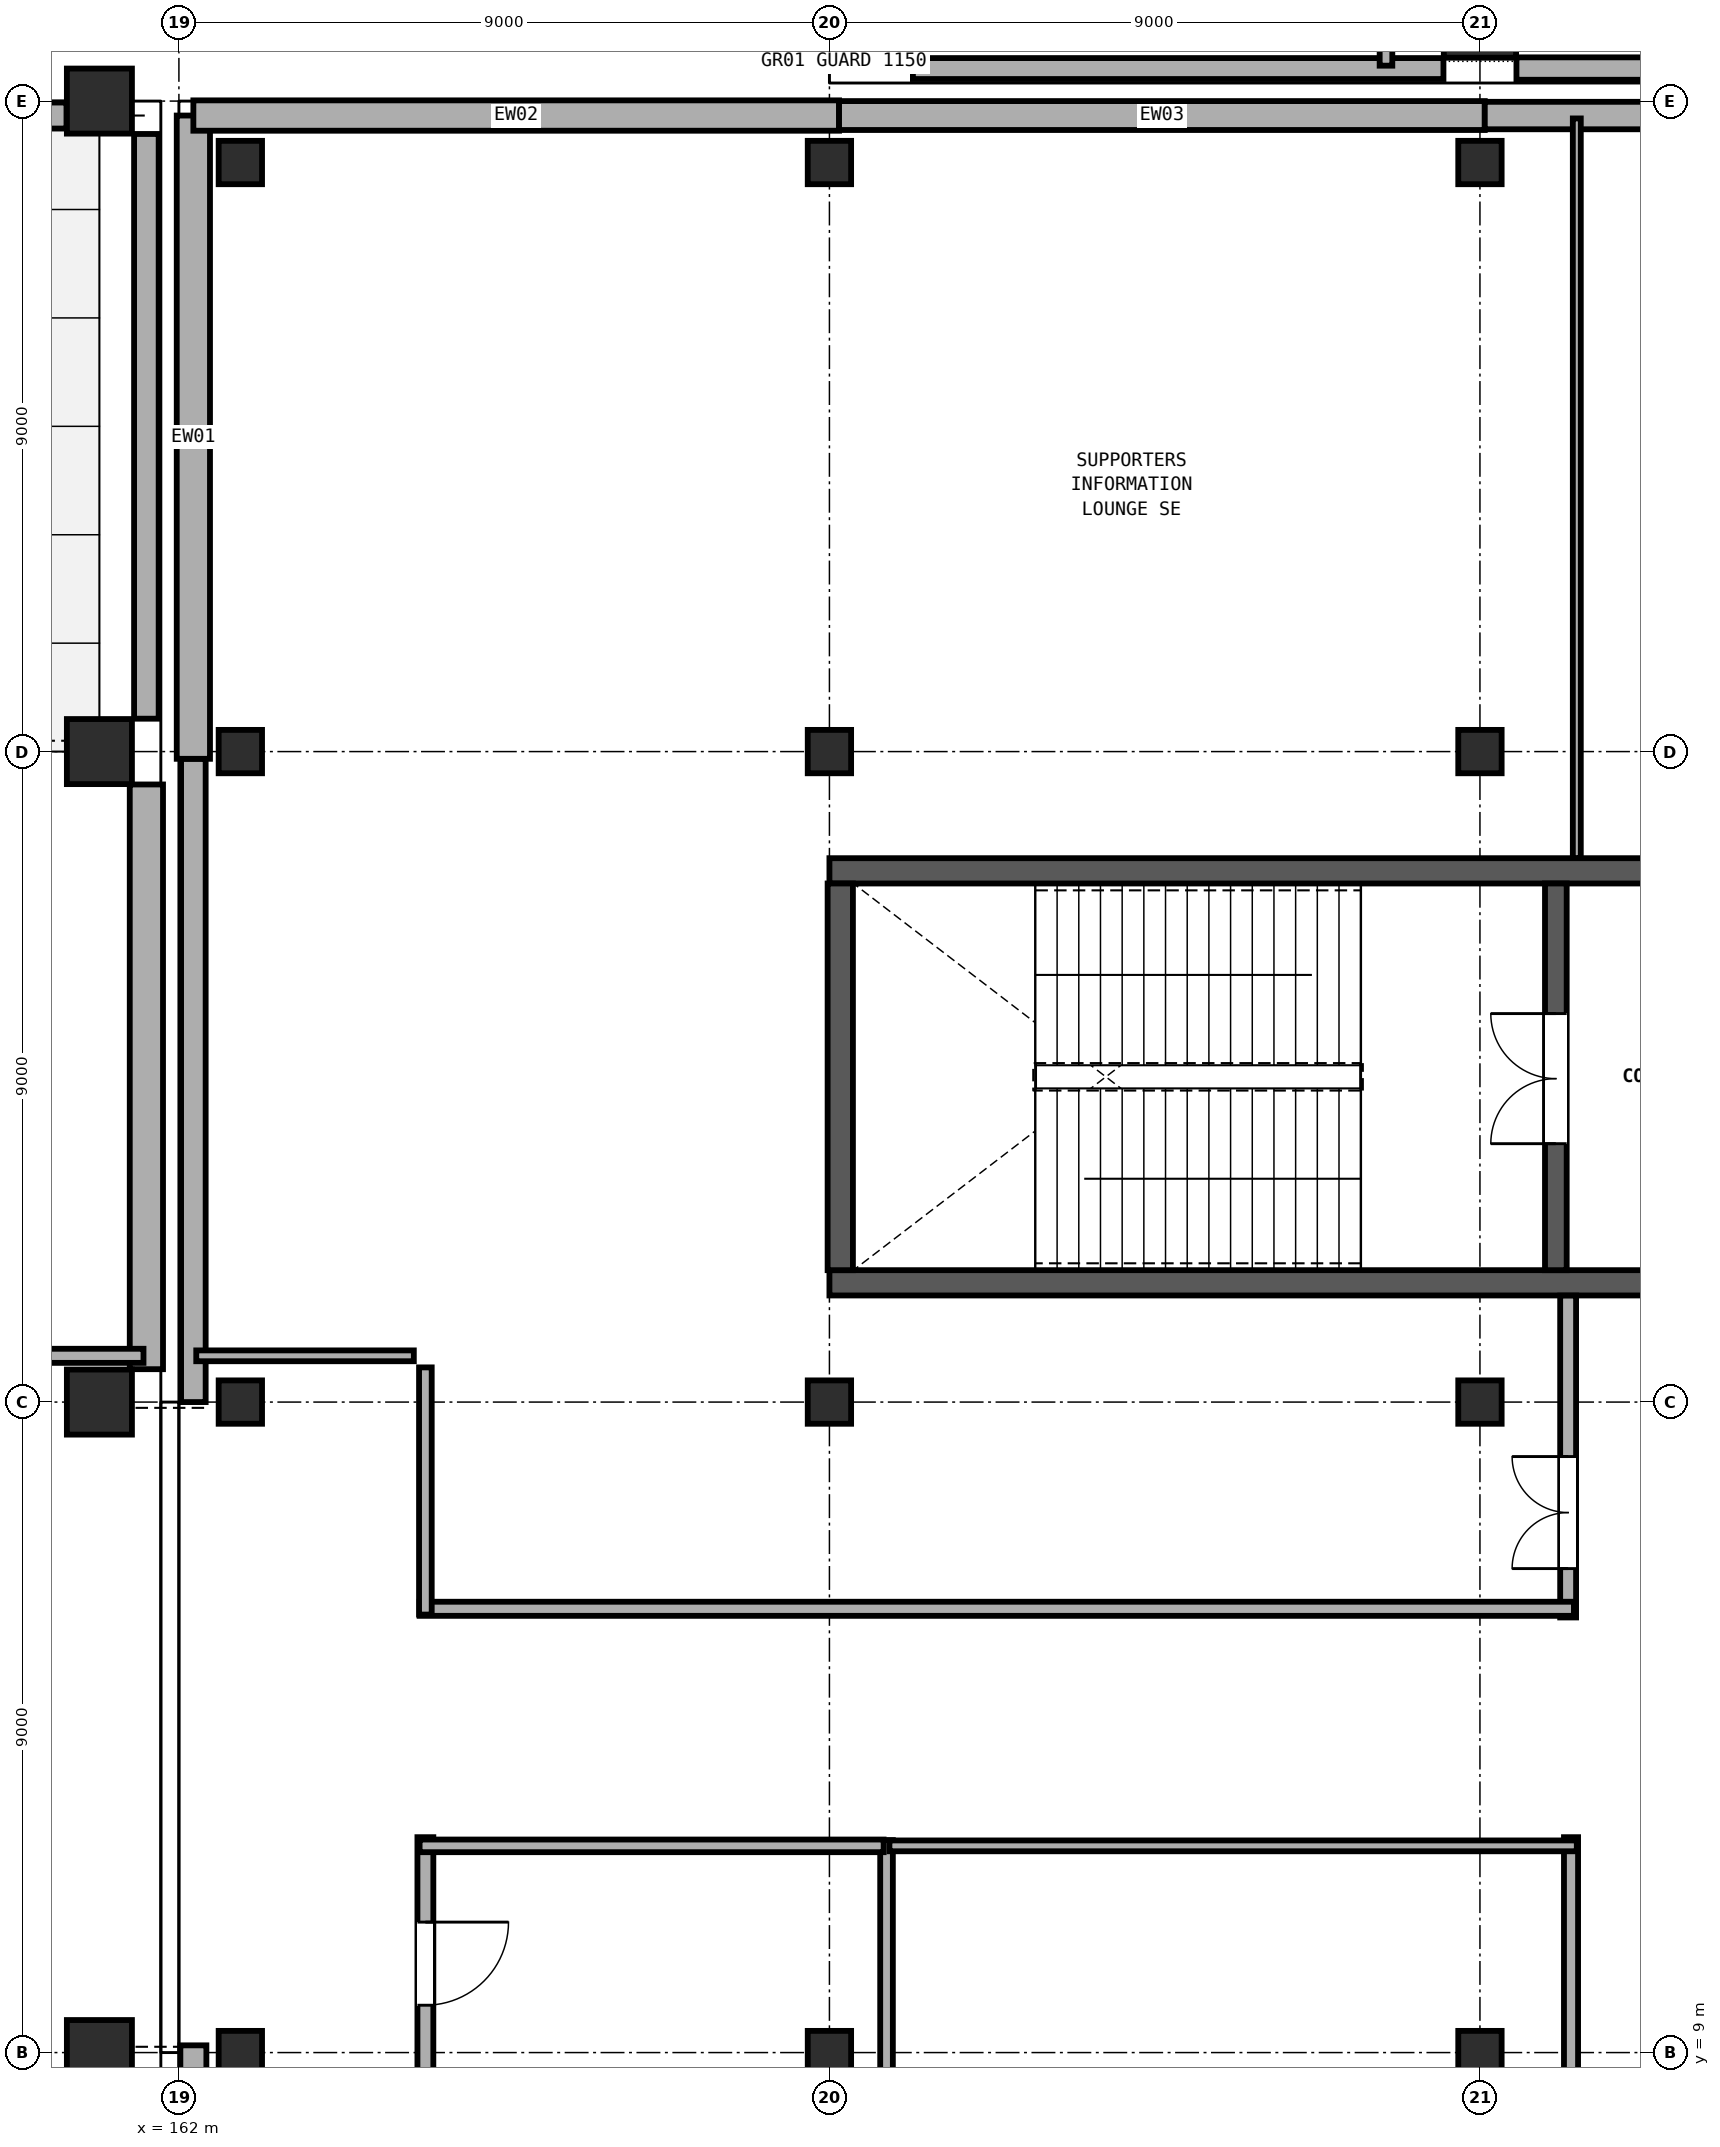
"""IFC4 building model, lengths in metres.
Left out: names, types, materials, properties, quantities, classifications, styles, units other than length and angle.
Written with IfcOpenShell. Run it as: python <this file> out.ifc"""

import sys

from ifc_helpers import new_model, si_unit, direction, frame, frame_2d, origin, origin_2d, place, context, subcontext, project, spatial, rectangle, extrude, element, fill, save


model = new_model("IFC4")
c1 = context("Model", 3, precision=1e-05, world=origin(), true_north=direction((0.0, 1.0)))
c2 = subcontext(c1, "Body", "Model", "MODEL_VIEW")
j1 = project(units=[si_unit("LENGTHUNIT", "METRE"), si_unit("PLANEANGLEUNIT", "RADIAN")], contexts=[c1])
p1 = place(None, origin())
s1 = spatial("IfcSite", under=j1, at=p1, CompositionType="ELEMENT")
p2 = place(p1, origin())
s2 = spatial("IfcBuilding", under=s1, at=p2, CompositionType="ELEMENT")
p3 = place(p2, frame((0.0, 0.0, 4.8)))
s3 = spatial("IfcBuildingStorey", under=s2, at=p3, CompositionType="ELEMENT", Elevation=4.8)
p4 = place(p3, frame((171.7, 37.1, 0.0), z_axis=(0.0, 0.0, 1.0), x_axis=(1.0, 0.0, 0.0)))
e1 = element("IfcColumn", 1, at=p4, inside=s3, PredefinedType="COLUMN", context=c2, shape_type="SweptSolid", body=[
    extrude(rectangle(XDim=0.9, YDim=0.9, at=origin_2d()), origin(), (0.0, 0.0, 1.0), 4.8),
])
p5 = place(p3, frame((180.0, 37.1, 0.0), z_axis=(0.0, 0.0, 1.0), x_axis=(1.0, 0.0, 0.0)))
e2 = element("IfcColumn", 2, at=p5, inside=s3, PredefinedType="COLUMN", context=c2, shape_type="SweptSolid", body=[
    extrude(rectangle(XDim=1.0, YDim=1.0, at=origin_2d()), origin(), (0.0, 0.0, 1.0), 4.8),
])
for number, where, z_axis, x_axis in (
    (3, (160.9, 9.0, 0.0), (0.0, 0.0, 1.0), (1.0, 0.0, 0.0)),
    (4, (160.9, 18.0, 0.0), (0.0, 0.0, 1.0), (1.0, 0.0, 0.0)),
    (5, (160.9, 27.0, 0.0), (0.0, 0.0, 1.0), (1.0, 0.0, 0.0)),
    (6, (160.9, 36.0, 0.0), (0.0, 0.0, 1.0), (1.0, 0.0, 0.0)),
):
    element("IfcColumn", number, at=place(p3, frame(where, z_axis=z_axis, x_axis=x_axis)), inside=s3, PredefinedType="COLUMN", context=c2, shape_type="SweptSolid", body=[
        extrude(rectangle(XDim=0.9, YDim=0.9, at=origin_2d()), origin(), (0.0, 0.0, 1.0), 4.8),
    ])
for number, where, z_axis, x_axis in (
    (7, (162.85, 9.0, 0.0), (0.0, 0.0, 1.0), (1.0, 0.0, 0.0)),
    (8, (162.85, 18.0, 0.0), (0.0, 0.0, 1.0), (1.0, 0.0, 0.0)),
    (9, (162.85, 27.0, 0.0), (0.0, 0.0, 1.0), (1.0, 0.0, 0.0)),
    (10, (162.85, 35.15, 0.0), (0.0, 0.0, 1.0), (1.0, 0.0, 0.0)),
    (11, (171.0, 9.0, 0.0), (0.0, 0.0, 1.0), (1.0, 0.0, 0.0)),
    (12, (171.0, 18.0, 0.0), (0.0, 0.0, 1.0), (1.0, 0.0, 0.0)),
    (13, (171.0, 27.0, 0.0), (0.0, 0.0, 1.0), (1.0, 0.0, 0.0)),
    (14, (171.0, 35.15, 0.0), (0.0, 0.0, 1.0), (1.0, 0.0, 0.0)),
    (15, (180.0, 9.0, 0.0), (0.0, 0.0, 1.0), (1.0, 0.0, 0.0)),
    (16, (180.0, 18.0, 0.0), (0.0, 0.0, 1.0), (1.0, 0.0, 0.0)),
    (17, (180.0, 27.0, 0.0), (0.0, 0.0, 1.0), (1.0, 0.0, 0.0)),
    (18, (180.0, 35.15, 0.0), (0.0, 0.0, 1.0), (1.0, 0.0, 0.0)),
):
    element("IfcColumn", number, at=place(p3, frame(where, z_axis=z_axis, x_axis=x_axis)), inside=s3, PredefinedType="COLUMN", context=c2, shape_type="SweptSolid", body=[
        extrude(rectangle(XDim=0.6, YDim=0.6, at=origin_2d()), origin(), (0.0, 0.0, 1.0), 4.8),
    ])
p6 = place(p3, frame((171.0, 19.65, 0.0), z_axis=(0.0, 0.0, 1.0), x_axis=(1.0, 0.0, 0.0)))
e19 = element("IfcWall", 19, at=p6, inside=s3, PredefinedType="SHEAR", context=c2, shape_type="SweptSolid", body=[
    extrude(rectangle(XDim=18.0, YDim=0.35, at=frame_2d((9.0, 0.0))), origin(), (0.0, 0.0, 1.0), 4.565),
])
p7 = place(p6, frame((11.4, 0.0, 0.0)))
e20 = element("IfcOpeningElement", 20, at=p7, cuts=e19, PredefinedType="OPENING", context=c2, shape_type="SweptSolid", body=[
    extrude(rectangle(XDim=1.9, YDim=2.25, at=frame_2d((0.95, 1.125))), frame((0.0, 0.185, 0.0), z_axis=(0.0, -1.0, 0.0), x_axis=(1.0, 0.0, 0.0)), (0.0, 0.0, 1.0), 0.37),
])
p8 = place(p3, frame((189.0, 25.35, 0.0), z_axis=(0.0, 0.0, 1.0), x_axis=(-1.0, 0.0, 0.0)))
e21 = element("IfcWall", 21, at=p8, inside=s3, PredefinedType="SHEAR", context=c2, shape_type="SweptSolid", body=[
    extrude(rectangle(XDim=18.0, YDim=0.35, at=frame_2d((9.0, 0.0))), origin(), (0.0, 0.0, 1.0), 4.565),
])
p9 = place(p3, frame((171.15, 25.175, 0.0), z_axis=(0.0, 0.0, 1.0), x_axis=(0.0, -1.0, 0.0)))
e22 = element("IfcWall", 22, at=p9, inside=s3, PredefinedType="SHEAR", context=c2, shape_type="SweptSolid", body=[
    extrude(rectangle(XDim=5.35, YDim=0.35, at=frame_2d((2.675, 0.0))), origin(), (0.0, 0.0, 1.0), 4.565),
])
p10 = place(p3, frame((181.05, 19.825, 0.0), z_axis=(0.0, 0.0, 1.0), x_axis=(0.0, 1.0, 0.0)))
e23 = element("IfcWall", 23, at=p10, inside=s3, PredefinedType="SHEAR", context=c2, shape_type="SweptSolid", body=[
    extrude(rectangle(XDim=5.35, YDim=0.3, at=frame_2d((2.675, 0.0))), origin(), (0.0, 0.0, 1.0), 4.565),
])
p11 = place(p10, frame((1.75, 0.0, 0.0)))
e24 = element("IfcOpeningElement", 24, at=p11, cuts=e23, PredefinedType="OPENING", context=c2, shape_type="SweptSolid", body=[
    extrude(rectangle(XDim=1.8, YDim=2.25, at=frame_2d((0.9, 1.125))), frame((0.0, 0.16, 0.0), z_axis=(0.0, -1.0, 0.0), x_axis=(1.0, 0.0, 0.0)), (0.0, 0.0, 1.0), 0.32),
])
p12 = place(p3, frame((188.545, 36.45, 0.0), z_axis=(0.0, 0.0, 1.0), x_axis=(-1.0, 0.0, 0.0)))
e25 = element("IfcWall", 25, at=p12, inside=s3, PredefinedType="SOLIDWALL", context=c2, shape_type="SweptSolid", body=[
    extrude(rectangle(XDim=8.04, YDim=0.31, at=frame_2d((4.02, 0.0))), origin(), (0.0, 0.0, 1.0), 3.28),
])
p13 = place(p3, frame((179.495, 36.45, 0.0), z_axis=(0.0, 0.0, 1.0), x_axis=(-1.0, 0.0, 0.0)))
e26 = element("IfcWall", 26, at=p13, inside=s3, PredefinedType="SOLIDWALL", context=c2, shape_type="SweptSolid", body=[
    extrude(rectangle(XDim=7.34, YDim=0.29, at=frame_2d((3.67, 0.0))), origin(), (0.0, 0.0, 1.0), 3.28),
])
p14 = place(p3, frame((153.455, 35.8, 0.0), z_axis=(0.0, 0.0, 1.0), x_axis=(1.0, 0.0, 0.0)))
e27 = element("IfcWall", 27, at=p14, inside=s3, PredefinedType="SOLIDWALL", context=c2, shape_type="SweptSolid", body=[
    extrude(rectangle(XDim=6.99, YDim=0.36, at=frame_2d((3.495, 0.0))), origin(), (0.0, 0.0, 1.0), 3.28),
])
p15 = place(p3, frame((161.55, 35.545, 0.0), z_axis=(0.0, 0.0, 1.0), x_axis=(0.0, -1.0, 0.0)))
e28 = element("IfcWall", 28, at=p15, inside=s3, PredefinedType="SOLIDWALL", context=c2, shape_type="SweptSolid", body=[
    extrude(rectangle(XDim=8.09, YDim=0.34, at=frame_2d((4.045, 0.0))), origin(), (0.0, 0.0, 1.0), 3.28),
])
p16 = place(p3, frame((161.55, 26.545, 0.0), z_axis=(0.0, 0.0, 1.0), x_axis=(0.0, -1.0, 0.0)))
e29 = element("IfcWall", 29, at=p16, inside=s3, PredefinedType="SOLIDWALL", context=c2, shape_type="SweptSolid", body=[
    extrude(rectangle(XDim=8.09, YDim=0.46, at=frame_2d((4.045, 0.0))), origin(), (0.0, 0.0, 1.0), 3.28),
])
p17 = place(p3, frame((162.2, 0.2, 0.0), z_axis=(0.0, 0.0, 1.0), x_axis=(0.0, 1.0, 0.0)))
e30 = element("IfcWall", 30, at=p17, inside=s3, PredefinedType="SOLIDWALL", context=c2, shape_type="SweptSolid", body=[
    extrude(rectangle(XDim=8.9, YDim=0.36, at=frame_2d((4.45, 0.0))), origin(), (0.0, 0.0, 1.0), 3.28),
])
p18 = place(p3, frame((162.2, 18.0, 0.0), z_axis=(0.0, 0.0, 1.0), x_axis=(0.0, 1.0, 0.0)))
e31 = element("IfcWall", 31, at=p18, inside=s3, PredefinedType="SOLIDWALL", context=c2, shape_type="SweptSolid", body=[
    extrude(rectangle(XDim=8.9, YDim=0.34, at=frame_2d((4.45, 0.0))), origin(), (0.0, 0.0, 1.0), 3.28),
])
p19 = place(p3, frame((162.2, 26.9, 0.0), z_axis=(0.0, 0.0, 1.0), x_axis=(0.0, 1.0, 0.0)))
e32 = element("IfcWall", 32, at=p19, inside=s3, PredefinedType="SOLIDWALL", context=c2, shape_type="SweptSolid", body=[
    extrude(rectangle(XDim=8.9, YDim=0.46, at=frame_2d((4.45, 0.0))), origin(), (0.0, 0.0, 1.0), 3.28),
])
p20 = place(p3, frame((162.2, 35.8, 0.0), z_axis=(0.0, 0.0, 1.0), x_axis=(1.0, 0.0, 0.0)))
e33 = element("IfcWall", 33, at=p20, inside=s3, PredefinedType="SOLIDWALL", context=c2, shape_type="SweptSolid", body=[
    extrude(rectangle(XDim=8.933, YDim=0.42, at=frame_2d((4.467, 0.0))), origin(), (0.0, 0.0, 1.0), 3.28),
])
p21 = place(p3, frame((171.133, 35.8, 0.0), z_axis=(0.0, 0.0, 1.0), x_axis=(1.0, 0.0, 0.0)))
e34 = element("IfcWall", 34, at=p21, inside=s3, PredefinedType="SOLIDWALL", context=c2, shape_type="SweptSolid", body=[
    extrude(rectangle(XDim=8.933, YDim=0.4, at=frame_2d((4.467, 0.0))), origin(), (0.0, 0.0, 1.0), 3.28),
])
p22 = place(p3, frame((180.067, 35.8, 0.0), z_axis=(0.0, 0.0, 1.0), x_axis=(1.0, 0.0, 0.0)))
e35 = element("IfcWall", 35, at=p22, inside=s3, PredefinedType="SOLIDWALL", context=c2, shape_type="SweptSolid", body=[
    extrude(rectangle(XDim=8.933, YDim=0.38, at=frame_2d((4.467, 0.0))), origin(), (0.0, 0.0, 1.0), 3.28),
])
p23 = place(p3, frame((178.7, 36.49, 0.0), z_axis=(0.0, 0.0, 1.0), x_axis=(0.0, 1.0, 0.0)))
e36 = element("IfcWall", 36, at=p23, inside=s3, PredefinedType="PARTITIONING", context=c2, shape_type="SweptSolid", body=[
    extrude(rectangle(XDim=10.39, YDim=0.175, at=frame_2d((5.195, 0.0))), origin(), (0.0, 0.0, 1.0), 3.28),
])
p24 = place(p3, frame((161.51, 18.64, 0.0), z_axis=(0.0, 0.0, 1.0), x_axis=(-1.0, 0.0, 0.0)))
e37 = element("IfcWall", 37, at=p24, inside=s3, PredefinedType="PARTITIONING", context=c2, shape_type="SweptSolid", body=[
    extrude(rectangle(XDim=3.36, YDim=0.195, at=frame_2d((1.68, 0.0))), origin(), (0.0, 0.0, 1.0), 3.28),
])
p25 = place(p3, frame((181.34, 25.527, 0.0), z_axis=(0.0, 0.0, 1.0), x_axis=(0.0, 1.0, 0.0)))
e38 = element("IfcWall", 38, at=p25, inside=s3, PredefinedType="PARTITIONING", context=c2, shape_type="SweptSolid", body=[
    extrude(rectangle(XDim=10.233, YDim=0.11, at=frame_2d((5.116, 0.0))), origin(), (0.0, 0.0, 1.0), 3.28),
])
p26 = place(p3, frame((181.22, 15.02, 0.0), z_axis=(0.0, 0.0, 1.0), x_axis=(0.0, 1.0, 0.0)))
e39 = element("IfcWall", 39, at=p26, inside=s3, PredefinedType="PARTITIONING", context=c2, shape_type="SweptSolid", body=[
    extrude(rectangle(XDim=4.453, YDim=0.22, at=frame_2d((2.227, 0.0))), origin(), (0.0, 0.0, 1.0), 3.28),
])
p27 = place(p26, frame((0.676, 0.0, 0.0)))
e40 = element("IfcOpeningElement", 40, at=p27, cuts=e39, PredefinedType="OPENING", context=c2, shape_type="SweptSolid", body=[
    extrude(rectangle(XDim=1.55, YDim=2.2, at=frame_2d((0.775, 1.1))), frame((0.0, 0.12, 0.0), z_axis=(0.0, -1.0, 0.0), x_axis=(1.0, 0.0, 0.0)), (0.0, 0.0, 1.0), 0.24),
])
p28 = place(p3, frame((181.3, 15.14, 0.0), z_axis=(0.0, 0.0, 1.0), x_axis=(-1.0, 0.0, 0.0)))
e41 = element("IfcWall", 41, at=p28, inside=s3, PredefinedType="PARTITIONING", context=c2, shape_type="SweptSolid", body=[
    extrude(rectangle(XDim=15.97, YDim=0.195, at=frame_2d((7.985, 0.0))), origin(), (0.0, 0.0, 1.0), 3.28),
])
p29 = place(p3, frame((165.41, 15.06, 0.0), z_axis=(0.0, 0.0, 1.0), x_axis=(0.0, 1.0, 0.0)))
e42 = element("IfcWall", 42, at=p29, inside=s3, PredefinedType="PARTITIONING", context=c2, shape_type="SweptSolid", body=[
    extrude(rectangle(XDim=3.42, YDim=0.175, at=frame_2d((1.71, 0.0))), origin(), (0.0, 0.0, 1.0), 3.28),
])
p30 = place(p3, frame((165.25, 18.64, 0.0), z_axis=(0.0, 0.0, 1.0), x_axis=(-1.0, 0.0, 0.0)))
e43 = element("IfcWall", 43, at=p30, inside=s3, PredefinedType="PARTITIONING", context=c2, shape_type="SweptSolid", body=[
    extrude(rectangle(XDim=3.01, YDim=0.15, at=frame_2d((1.505, 0.0))), origin(), (0.0, 0.0, 1.0), 3.28),
])
p31 = place(p3, frame((181.26, 0.2, 0.0), z_axis=(0.0, 0.0, 1.0), x_axis=(0.0, 1.0, 0.0)))
e44 = element("IfcWall", 44, at=p31, inside=s3, PredefinedType="PARTITIONING", context=c2, shape_type="SweptSolid", body=[
    extrude(rectangle(XDim=11.78, YDim=0.195, at=frame_2d((5.89, 0.0))), origin(), (0.0, 0.0, 1.0), 3.28),
])
p32 = place(p31, frame((5.33, 0.0, 0.0)))
e45 = element("IfcOpeningElement", 45, at=p32, cuts=e44, PredefinedType="OPENING", context=c2, shape_type="SweptSolid", body=[
    extrude(rectangle(XDim=1.12, YDim=2.22, at=frame_2d((0.56, 1.11))), frame((0.0, 0.107, 0.0), z_axis=(0.0, -1.0, 0.0), x_axis=(1.0, 0.0, 0.0)), (0.0, 0.0, 1.0), 0.215),
])
p33 = place(p3, frame((171.79, 0.24, 0.0), z_axis=(0.0, 0.0, 1.0), x_axis=(0.0, 1.0, 0.0)))
e46 = element("IfcWall", 46, at=p33, inside=s3, PredefinedType="PARTITIONING", context=c2, shape_type="SweptSolid", body=[
    extrude(rectangle(XDim=11.7, YDim=0.175, at=frame_2d((5.85, 0.0))), origin(), (0.0, 0.0, 1.0), 3.28),
])
p34 = place(p3, frame((171.83, 11.86, 0.0), z_axis=(0.0, 0.0, 1.0), x_axis=(1.0, 0.0, 0.0)))
e47 = element("IfcWall", 47, at=p34, inside=s3, PredefinedType="PARTITIONING", context=c2, shape_type="SweptSolid", body=[
    extrude(rectangle(XDim=9.51, YDim=0.15, at=frame_2d((4.755, 0.0))), origin(), (0.0, 0.0, 1.0), 3.28),
])
p35 = place(p3, frame((165.41, 11.98, 0.0), z_axis=(0.0, 0.0, 1.0), x_axis=(0.0, -1.0, 0.0)))
e48 = element("IfcWall", 48, at=p35, inside=s3, PredefinedType="PARTITIONING", context=c2, shape_type="SweptSolid", body=[
    extrude(rectangle(XDim=3.5, YDim=0.22, at=frame_2d((1.75, 0.0))), origin(), (0.0, 0.0, 1.0), 3.28),
])
p36 = place(p35, frame((1.175, 0.0, 0.0)))
e49 = element("IfcOpeningElement", 49, at=p36, cuts=e48, PredefinedType="OPENING", context=c2, shape_type="SweptSolid", body=[
    extrude(rectangle(XDim=1.15, YDim=2.15, at=frame_2d((0.575, 1.075))), frame((0.0, 0.12, 0.0), z_axis=(0.0, -1.0, 0.0), x_axis=(1.0, 0.0, 0.0)), (0.0, 0.0, 1.0), 0.24),
])
p37 = place(p3, frame((165.33, 11.86, 0.0), z_axis=(0.0, 0.0, 1.0), x_axis=(1.0, 0.0, 0.0)))
e50 = element("IfcWall", 50, at=p37, inside=s3, PredefinedType="PARTITIONING", context=c2, shape_type="SweptSolid", body=[
    extrude(rectangle(XDim=6.42, YDim=0.175, at=frame_2d((3.21, 0.0))), origin(), (0.0, 0.0, 1.0), 3.28),
])
p38 = place(p11, origin())
e51 = element("IfcDoor", 51, at=p38, inside=s3, OperationType="DOUBLE_DOOR_SINGLE_SWING", PredefinedType="DOOR", context=c2, shape_type="SweptSolid", body=[
    extrude(rectangle(XDim=1.8, YDim=2.25, at=frame_2d((0.9, 1.125))), frame((0.0, 0.025, 0.0), z_axis=(0.0, -1.0, 0.0), x_axis=(1.0, 0.0, 0.0)), (0.0, 0.0, 1.0), 0.05),
])
fill(e24, e51)
p39 = place(p27, origin())
e52 = element("IfcDoor", 52, at=p39, inside=s3, OperationType="DOUBLE_DOOR_SINGLE_SWING", PredefinedType="DOOR", context=c2, shape_type="SweptSolid", body=[
    extrude(rectangle(XDim=1.55, YDim=2.2, at=frame_2d((0.775, 1.1))), frame((0.0, 0.025, 0.0), z_axis=(0.0, -1.0, 0.0), x_axis=(1.0, 0.0, 0.0)), (0.0, 0.0, 1.0), 0.05),
])
fill(e40, e52)
p40 = place(p36, origin())
e53 = element("IfcDoor", 53, at=p40, inside=s3, OperationType="SINGLE_SWING_LEFT", PredefinedType="DOOR", context=c2, shape_type="SweptSolid", body=[
    extrude(rectangle(XDim=1.15, YDim=2.15, at=frame_2d((0.575, 1.075))), frame((0.0, 0.025, 0.0), z_axis=(0.0, -1.0, 0.0), x_axis=(1.0, 0.0, 0.0)), (0.0, 0.0, 1.0), 0.05),
])
fill(e49, e53)
save(model, sys.argv[1])
